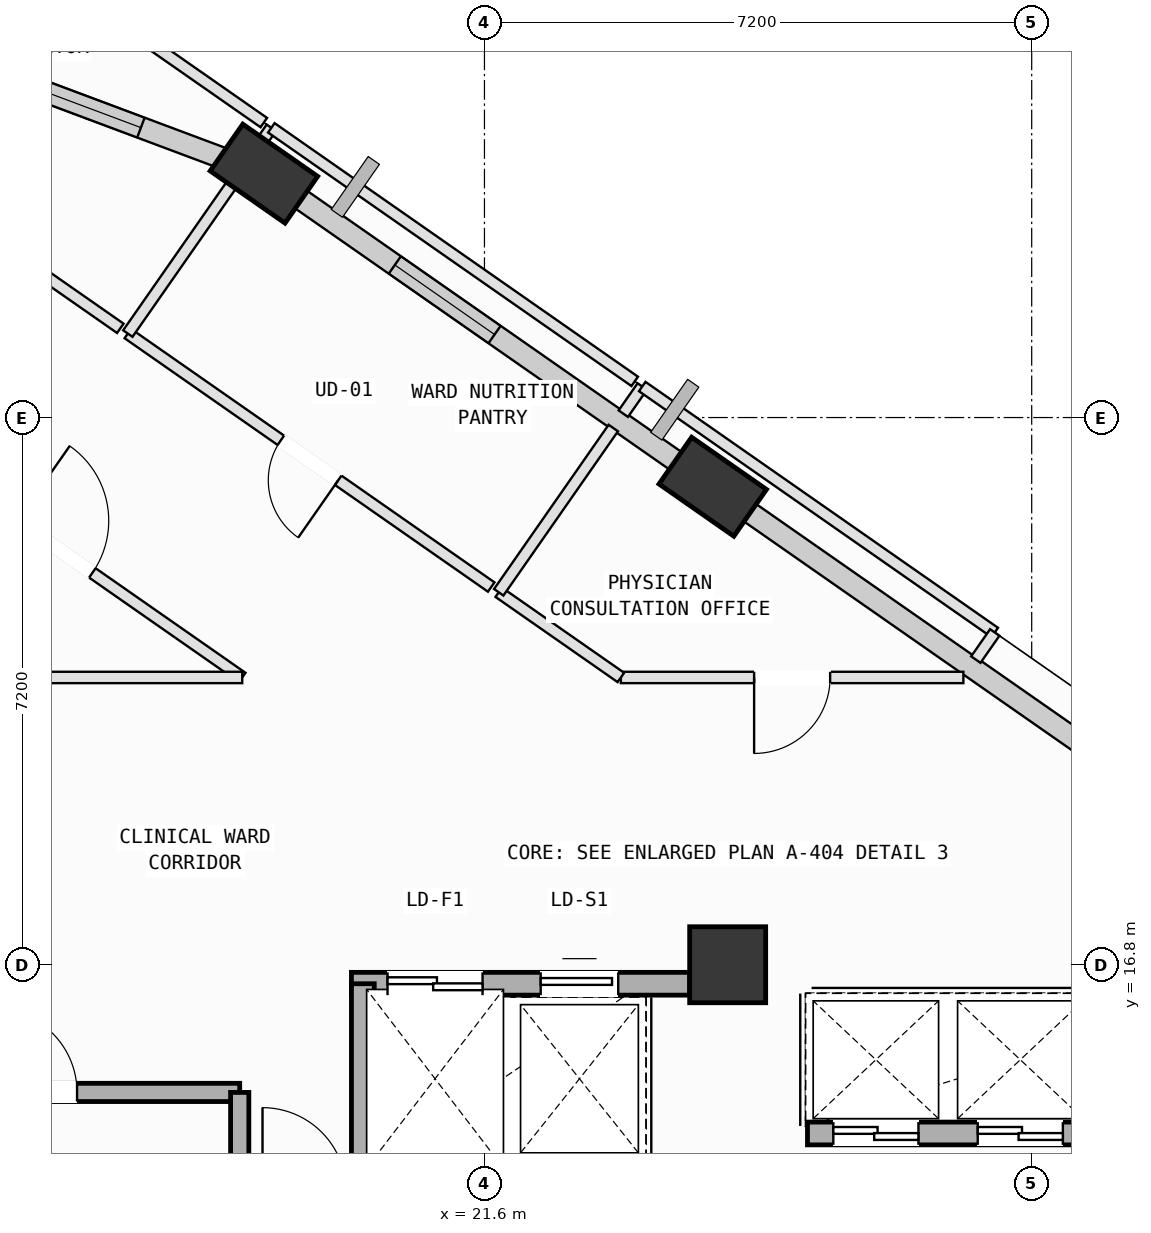
"""IFC4 building model, lengths in metres.
Left out: names, types, materials, properties, quantities, classifications, styles, units other than length and angle.
Written with IfcOpenShell. Run it as: python <this file> out.ifc"""

import sys

from ifc_helpers import new_model, si_unit, direction, frame, frame_2d, origin, origin_2d, place, context, subcontext, project, spatial, rectangle, extrude, element, fill, save


model = new_model("IFC4")
c1 = context("Model", 3, precision=1e-05, world=origin(), true_north=direction((0.0, 1.0)))
c2 = subcontext(c1, "Body", "Model", "MODEL_VIEW")
j1 = project(units=[si_unit("LENGTHUNIT", "METRE"), si_unit("PLANEANGLEUNIT", "RADIAN")], contexts=[c1])
p1 = place(None, origin())
s1 = spatial("IfcSite", under=j1, at=p1, CompositionType="ELEMENT")
p2 = place(p1, origin())
s2 = spatial("IfcBuilding", under=s1, at=p2, CompositionType="ELEMENT")
p3 = place(p2, frame((0.0, 0.0, 259.2)))
s3 = spatial("IfcBuildingStorey", under=s2, at=p3, CompositionType="ELEMENT", Elevation=259.2)
p4 = place(p3, frame((24.8, 16.8, 0.0), z_axis=(0.0, 0.0, 1.0), x_axis=(1.0, 0.0, 0.0)))
e1 = element("IfcColumn", 1, at=p4, inside=s3, PredefinedType="COLUMN", context=c2, shape_type="SweptSolid", body=[
    extrude(rectangle(XDim=1.0, YDim=1.0, at=origin_2d()), origin(), (0.0, 0.0, 1.0), 4.0),
])
p5 = place(p3, frame((24.604, 23.09, 0.002), z_axis=(0.007386709361, -0.037177735545, 0.999281368036), x_axis=(-0.915845651097, 0.400944413579, 0.021686875903)))
e2 = element("IfcColumn", 2, at=p5, inside=s3, PredefinedType="COLUMN", context=c2, shape_type="SweptSolid", body=[
    extrude(rectangle(XDim=1.2, YDim=0.75, at=origin_2d()), origin(), (0.0, 0.0, 1.0), 3.999),
])
p6 = place(p3, frame((18.698, 27.209, 0.002), z_axis=(-0.009450651527, -0.061703608682, 0.998049773238), x_axis=(-0.724246077082, 0.688616038079, 0.035715149892)))
e3 = element("IfcColumn", 3, at=p6, inside=s3, PredefinedType="COLUMN", context=c2, shape_type="SweptSolid", body=[
    extrude(rectangle(XDim=1.2, YDim=0.75, at=origin_2d()), origin(), (0.0, 0.0, 1.0), 4.004),
])
p7 = place(p3, frame((24.972, 22.833, 0.0), z_axis=(0.0, 0.0, 1.0), x_axis=(0.820150694585, -0.572147566779, 0.0)))
e4 = element("IfcWall", 4, at=p7, inside=s3, PredefinedType="SOLIDWALL", context=c2, shape_type="SweptSolid", body=[
    extrude(rectangle(XDim=6.958, YDim=0.28, at=frame_2d((3.479, 0.0))), origin(), (0.0, 0.0, 1.0), 3.165),
])
p8 = place(p3, frame((19.056, 26.959, 0.0), z_axis=(0.0, 0.0, 1.0), x_axis=(0.820153911143, -0.572142955945, 0.0)))
e5 = element("IfcWall", 5, at=p8, inside=s3, PredefinedType="SOLIDWALL", context=c2, shape_type="SweptSolid", body=[
    extrude(rectangle(XDim=6.424, YDim=0.28, at=frame_2d((3.212, 0.0))), origin(), (0.0, 0.0, 1.0), 3.265),
])
p9 = place(p8, frame((1.664, 0.0, 0.75)))
e6 = element("IfcOpeningElement", 6, at=p9, cuts=e5, PredefinedType="OPENING", context=c2, shape_type="SweptSolid", body=[
    extrude(rectangle(XDim=1.6, YDim=1.95, at=frame_2d((0.8, 0.975))), frame((0.0, 0.15, 0.0), z_axis=(0.0, -1.0, 0.0), x_axis=(1.0, 0.0, 0.0)), (0.0, 0.0, 1.0), 0.3),
])
p10 = place(p3, frame((13.402, 29.191, 0.0), z_axis=(0.0, 0.0, 1.0), x_axis=(0.936554152669, -0.350522922387, 0.0)))
e7 = element("IfcWall", 7, at=p10, inside=s3, PredefinedType="SOLIDWALL", context=c2, shape_type="SweptSolid", body=[
    extrude(rectangle(XDim=5.302, YDim=0.28, at=frame_2d((2.651, 0.0))), origin(), (0.0, 0.0, 1.0), 3.265),
])
p11 = place(p10, frame((1.927, 0.0, 0.75)))
e8 = element("IfcOpeningElement", 8, at=p11, cuts=e7, PredefinedType="OPENING", context=c2, shape_type="SweptSolid", body=[
    extrude(rectangle(XDim=2.0, YDim=1.95, at=frame_2d((1.0, 0.975))), frame((0.0, 0.15, 0.0), z_axis=(0.0, -1.0, 0.0), x_axis=(1.0, 0.0, 0.0)), (0.0, 0.0, 1.0), 0.3),
])
p12 = place(p3, frame((14.92, 15.12, 0.0), z_axis=(0.0, 0.0, 1.0), x_axis=(1.0, 0.0, 0.0)))
e9 = element("IfcWall", 9, at=p12, inside=s3, PredefinedType="SOLIDWALL", context=c2, shape_type="SweptSolid", body=[
    extrude(rectangle(XDim=3.46, YDim=0.24, at=frame_2d((1.73, 0.0))), origin(), (0.0, 0.0, 1.0), 3.78),
])
p13 = place(p12, frame((0.22, 0.0, 0.0)))
e10 = element("IfcOpeningElement", 10, at=p13, cuts=e9, PredefinedType="OPENING", context=c2, shape_type="SweptSolid", body=[
    extrude(rectangle(XDim=1.1, YDim=2.15, at=frame_2d((0.55, 1.075))), frame((0.0, 0.13, 0.0), z_axis=(0.0, -1.0, 0.0), x_axis=(1.0, 0.0, 0.0)), (0.0, 0.0, 1.0), 0.26),
])
p14 = place(p3, frame((18.38, 15.12, 0.0), z_axis=(0.0, 0.0, 1.0), x_axis=(0.0, -1.0, 0.0)))
e11 = element("IfcWall", 11, at=p14, inside=s3, PredefinedType="SOLIDWALL", context=c2, shape_type="SweptSolid", body=[
    extrude(rectangle(XDim=7.045, YDim=0.24, at=frame_2d((3.522, 0.0))), origin(), (0.0, 0.0, 1.0), 3.78),
])
p15 = place(p3, frame((19.85, 16.55, 0.0), z_axis=(0.0, 0.0, 1.0), x_axis=(1.0, 0.0, 0.0)))
e12 = element("IfcWall", 12, at=p15, inside=s3, PredefinedType="SOLIDWALL", context=c2, shape_type="SweptSolid", body=[
    extrude(rectangle(XDim=4.45, YDim=0.3, at=frame_2d((2.225, 0.0))), origin(), (0.0, 0.0, 1.0), 3.78),
])
p16 = place(p15, frame((0.475, 0.0, 0.0)))
e13 = element("IfcOpeningElement", 13, at=p16, cuts=e12, PredefinedType="OPENING", context=c2, shape_type="SweptSolid", body=[
    extrude(rectangle(XDim=1.25, YDim=2.18, at=frame_2d((0.625, 1.09))), frame((0.0, 0.16, 0.0), z_axis=(0.0, -1.0, 0.0), x_axis=(1.0, 0.0, 0.0)), (0.0, 0.0, 1.0), 0.32),
])
p17 = place(p15, frame((2.49, 0.0, 0.0)))
e14 = element("IfcOpeningElement", 14, at=p17, cuts=e12, PredefinedType="OPENING", context=c2, shape_type="SweptSolid", body=[
    extrude(rectangle(XDim=1.02, YDim=2.12, at=frame_2d((0.51, 1.06))), frame((0.0, 0.16, 0.0), z_axis=(0.0, -1.0, 0.0), x_axis=(1.0, 0.0, 0.0)), (0.0, 0.0, 1.0), 0.32),
])
p18 = place(p3, frame((20.0, 13.82, 0.0), z_axis=(0.0, 0.0, 1.0), x_axis=(0.0, 1.0, 0.0)))
e15 = element("IfcWall", 15, at=p18, inside=s3, PredefinedType="SOLIDWALL", context=c2, shape_type="SweptSolid", body=[
    extrude(rectangle(XDim=2.73, YDim=0.3, at=frame_2d((1.365, 0.0))), origin(), (0.0, 0.0, 1.0), 3.78),
])
p19 = place(p3, frame((25.85, 14.58, 0.0), z_axis=(0.0, 0.0, 1.0), x_axis=(1.0, 0.0, 0.0)))
e16 = element("IfcWall", 16, at=p19, inside=s3, PredefinedType="SOLIDWALL", context=c2, shape_type="SweptSolid", body=[
    extrude(rectangle(XDim=5.45, YDim=0.3, at=frame_2d((2.725, 0.0))), origin(), (0.0, 0.0, 1.0), 3.78),
])
p20 = place(p19, frame((0.34, 0.0, 0.0)))
e17 = element("IfcOpeningElement", 17, at=p20, cuts=e16, PredefinedType="OPENING", context=c2, shape_type="SweptSolid", body=[
    extrude(rectangle(XDim=1.12, YDim=2.15, at=frame_2d((0.56, 1.075))), frame((0.0, 0.16, 0.0), z_axis=(0.0, -1.0, 0.0), x_axis=(1.0, 0.0, 0.0)), (0.0, 0.0, 1.0), 0.32),
])
p21 = place(p19, frame((2.24, 0.0, 0.0)))
e18 = element("IfcOpeningElement", 18, at=p21, cuts=e16, PredefinedType="OPENING", context=c2, shape_type="SweptSolid", body=[
    extrude(rectangle(XDim=1.12, YDim=2.15, at=frame_2d((0.56, 1.075))), frame((0.0, 0.16, 0.0), z_axis=(0.0, -1.0, 0.0), x_axis=(1.0, 0.0, 0.0)), (0.0, 0.0, 1.0), 0.32),
])
p22 = place(p3, frame((13.485, 24.018, 0.0), z_axis=(0.0, 0.0, 1.0), x_axis=(0.820137595975, -0.572166342656, 0.0)))
e19 = element("IfcWall", 19, at=p22, inside=s3, PredefinedType="PARTITIONING", context=c2, shape_type="SweptSolid", body=[
    extrude(rectangle(XDim=6.009, YDim=0.15, at=frame_2d((3.004, 0.0))), origin(), (0.0, 0.0, 1.0), 3.415),
])
p23 = place(p22, frame((2.404, 0.0, 0.0)))
e20 = element("IfcOpeningElement", 20, at=p23, cuts=e19, PredefinedType="OPENING", context=c2, shape_type="SweptSolid", body=[
    extrude(rectangle(XDim=1.2, YDim=2.15, at=frame_2d((0.6, 1.075))), frame((0.0, 0.085, 0.0), z_axis=(0.0, -1.0, 0.0), x_axis=(1.0, 0.0, 0.0)), (0.0, 0.0, 1.0), 0.17),
])
p24 = place(p3, frame((18.413, 20.58, 0.0), z_axis=(0.0, 0.0, 1.0), x_axis=(-1.0, 0.0, 0.0)))
e21 = element("IfcWall", 21, at=p24, inside=s3, PredefinedType="PARTITIONING", context=c2, shape_type="SweptSolid", body=[
    extrude(rectangle(XDim=3.416, YDim=0.15, at=frame_2d((1.708, 0.0))), origin(), (0.0, 0.0, 1.0), 3.78),
])
p25 = place(p3, frame((27.901, 20.58, 0.0), z_axis=(0.0, 0.0, 1.0), x_axis=(-1.0, 0.0, 0.0)))
e22 = element("IfcWall", 22, at=p25, inside=s3, PredefinedType="PARTITIONING", context=c2, shape_type="SweptSolid", body=[
    extrude(rectangle(XDim=4.506, YDim=0.15, at=frame_2d((2.253, 0.0))), origin(), (0.0, 0.0, 1.0), 3.415),
])
p26 = place(p25, frame((1.753, 0.0, 0.0)))
e23 = element("IfcOpeningElement", 23, at=p26, cuts=e22, PredefinedType="OPENING", context=c2, shape_type="SweptSolid", body=[
    extrude(rectangle(XDim=1.0, YDim=2.12, at=frame_2d((0.5, 1.06))), frame((0.0, 0.085, 0.0), z_axis=(0.0, -1.0, 0.0), x_axis=(1.0, 0.0, 0.0)), (0.0, 0.0, 1.0), 0.17),
])
p27 = place(p3, frame((23.395, 20.58, 0.0), z_axis=(0.0, 0.0, 1.0), x_axis=(-0.820190863983, 0.572089981244, 0.0)))
e24 = element("IfcWall", 24, at=p27, inside=s3, PredefinedType="PARTITIONING", context=c2, shape_type="SweptSolid", body=[
    extrude(rectangle(XDim=1.959, YDim=0.15, at=frame_2d((0.979, 0.0))), origin(), (0.0, 0.0, 1.0), 3.415),
])
p28 = place(p3, frame((21.788, 21.701, 0.0), z_axis=(0.0, 0.0, 1.0), x_axis=(0.571943852359, 0.820292770752, 0.0)))
e25 = element("IfcWall", 25, at=p28, inside=s3, PredefinedType="PARTITIONING", context=c2, shape_type="SweptSolid", body=[
    extrude(rectangle(XDim=2.635, YDim=0.15, at=frame_2d((1.317, 0.0))), origin(), (0.0, 0.0, 1.0), 3.78),
])
p29 = place(p3, frame((23.427, 24.051, 0.0), z_axis=(0.0, 0.0, 1.0), x_axis=(0.572181596024, 0.820126954301, 0.0)))
e26 = element("IfcWall", 26, at=p29, inside=s3, PredefinedType="PARTITIONING", context=c2, shape_type="SweptSolid", body=[
    extrude(rectangle(XDim=0.435, YDim=0.15, at=frame_2d((0.218, 0.0))), origin(), (0.0, 0.0, 1.0), 3.78),
])
p30 = place(p3, frame((23.676, 24.408, 0.0), z_axis=(0.0, 0.0, 1.0), x_axis=(0.820121300716, -0.57218969941, 0.0)))
e27 = element("IfcWall", 27, at=p30, inside=s3, PredefinedType="PARTITIONING", context=c2, shape_type="SweptSolid", body=[
    extrude(rectangle(XDim=5.655, YDim=0.15, at=frame_2d((2.828, 0.0))), origin(), (0.0, 0.0, 1.0), 3.78),
])
p31 = place(p3, frame((28.314, 21.172, 0.0), z_axis=(0.0, 0.0, 1.0), x_axis=(-0.571918449579, -0.820310482093, 0.0)))
e28 = element("IfcWall", 28, at=p31, inside=s3, PredefinedType="PARTITIONING", context=c2, shape_type="SweptSolid", body=[
    extrude(rectangle(XDim=0.435, YDim=0.15, at=frame_2d((0.218, 0.0))), origin(), (0.0, 0.0, 1.0), 3.78),
])
p32 = place(p3, frame((21.689, 21.77, 0.0), z_axis=(0.0, 0.0, 1.0), x_axis=(-0.820177227942, 0.572109530393, 0.0)))
e29 = element("IfcWall", 29, at=p32, inside=s3, PredefinedType="PARTITIONING", context=c2, shape_type="SweptSolid", body=[
    extrude(rectangle(XDim=5.829, YDim=0.15, at=frame_2d((2.915, 0.0))), origin(), (0.0, 0.0, 1.0), 3.78),
])
p33 = place(p32, frame((2.455, 0.0, 0.0)))
e30 = element("IfcOpeningElement", 30, at=p33, cuts=e29, PredefinedType="OPENING", context=c2, shape_type="SweptSolid", body=[
    extrude(rectangle(XDim=0.92, YDim=2.1, at=frame_2d((0.46, 1.05))), frame((0.0, 0.085, 0.0), z_axis=(0.0, -1.0, 0.0), x_axis=(1.0, 0.0, 0.0)), (0.0, 0.0, 1.0), 0.17),
])
p34 = place(p3, frame((16.908, 25.105, 0.0), z_axis=(0.0, 0.0, 1.0), x_axis=(0.571980057707, 0.820267525619, 0.0)))
e31 = element("IfcWall", 31, at=p34, inside=s3, PredefinedType="PARTITIONING", context=c2, shape_type="SweptSolid", body=[
    extrude(rectangle(XDim=2.577, YDim=0.15, at=frame_2d((1.289, 0.0))), origin(), (0.0, 0.0, 1.0), 3.78),
])
p35 = place(p3, frame((18.48, 27.359, 0.0), z_axis=(0.0, 0.0, 1.0), x_axis=(0.571918856156, 0.820310198628, 0.0)))
e32 = element("IfcWall", 32, at=p35, inside=s3, PredefinedType="PARTITIONING", context=c2, shape_type="SweptSolid", body=[
    extrude(rectangle(XDim=0.552, YDim=0.15, at=frame_2d((0.276, 0.0))), origin(), (0.0, 0.0, 1.0), 3.78),
])
p36 = place(p3, frame((18.796, 27.812, 0.0), z_axis=(0.0, 0.0, 1.0), x_axis=(0.820098618175, -0.572222208995, 0.0)))
e33 = element("IfcWall", 33, at=p36, inside=s3, PredefinedType="PARTITIONING", context=c2, shape_type="SweptSolid", body=[
    extrude(rectangle(XDim=5.83, YDim=0.15, at=frame_2d((2.915, 0.0))), origin(), (0.0, 0.0, 1.0), 3.78),
])
p37 = place(p3, frame((14.994, 30.464, 0.0), z_axis=(0.0, 0.0, 1.0), x_axis=(0.820185960607, -0.572097011025, 0.0)))
e34 = element("IfcWall", 34, at=p37, inside=s3, PredefinedType="PARTITIONING", context=c2, shape_type="SweptSolid", body=[
    extrude(rectangle(XDim=4.515, YDim=0.15, at=frame_2d((2.257, 0.0))), origin(), (0.0, 0.0, 1.0), 3.78),
])
p38 = place(p3, frame((16.809, 25.174, 0.0), z_axis=(0.0, 0.0, 1.0), x_axis=(-0.820095076811, 0.572227284382, 0.0)))
e35 = element("IfcWall", 35, at=p38, inside=s3, PredefinedType="PARTITIONING", context=c2, shape_type="SweptSolid", body=[
    extrude(rectangle(XDim=5.349, YDim=0.15, at=frame_2d((2.675, 0.0))), origin(), (0.0, 0.0, 1.0), 3.78),
])
p39 = place(p38, frame((2.215, 0.0, 0.0)))
e36 = element("IfcOpeningElement", 36, at=p39, cuts=e35, PredefinedType="OPENING", context=c2, shape_type="SweptSolid", body=[
    extrude(rectangle(XDim=0.92, YDim=2.1, at=frame_2d((0.46, 1.05))), frame((0.0, 0.085, 0.0), z_axis=(0.0, -1.0, 0.0), x_axis=(1.0, 0.0, 0.0)), (0.0, 0.0, 1.0), 0.17),
])
p40 = place(p9, origin())
e37 = element("IfcWindow", 37, at=p40, inside=s3, PartitioningType="SINGLE_PANEL", PredefinedType="WINDOW", context=c2, shape_type="SweptSolid", body=[
    extrude(rectangle(XDim=1.6, YDim=1.95, at=frame_2d((0.8, 0.975))), frame((0.0, 0.03, 0.0), z_axis=(0.0, -1.0, 0.0), x_axis=(1.0, 0.0, 0.0)), (0.0, 0.0, 1.0), 0.06),
])
fill(e6, e37)
p41 = place(p11, origin())
e38 = element("IfcWindow", 38, at=p41, inside=s3, PartitioningType="SINGLE_PANEL", PredefinedType="WINDOW", context=c2, shape_type="SweptSolid", body=[
    extrude(rectangle(XDim=2.0, YDim=1.95, at=frame_2d((1.0, 0.975))), frame((0.0, 0.03, 0.0), z_axis=(0.0, -1.0, 0.0), x_axis=(1.0, 0.0, 0.0)), (0.0, 0.0, 1.0), 0.06),
])
fill(e8, e38)
p42 = place(p13, origin())
e39 = element("IfcDoor", 39, at=p42, inside=s3, OperationType="SINGLE_SWING_LEFT", PredefinedType="DOOR", context=c2, shape_type="SweptSolid", body=[
    extrude(rectangle(XDim=1.1, YDim=2.15, at=frame_2d((0.55, 1.075))), frame((0.0, 0.025, 0.0), z_axis=(0.0, -1.0, 0.0), x_axis=(1.0, 0.0, 0.0)), (0.0, 0.0, 1.0), 0.05),
])
fill(e10, e39)
p43 = place(p20, origin())
e40 = element("IfcDoor", 40, at=p43, inside=s3, OperationType="DOUBLE_DOOR_SLIDING", PredefinedType="DOOR", context=c2, shape_type="SweptSolid", body=[
    extrude(rectangle(XDim=1.12, YDim=2.15, at=frame_2d((0.56, 1.075))), frame((0.0, 0.025, 0.0), z_axis=(0.0, -1.0, 0.0), x_axis=(1.0, 0.0, 0.0)), (0.0, 0.0, 1.0), 0.05),
])
fill(e17, e40)
p44 = place(p21, origin())
e41 = element("IfcDoor", 41, at=p44, inside=s3, OperationType="DOUBLE_DOOR_SLIDING", PredefinedType="DOOR", context=c2, shape_type="SweptSolid", body=[
    extrude(rectangle(XDim=1.12, YDim=2.15, at=frame_2d((0.56, 1.075))), frame((0.0, 0.025, 0.0), z_axis=(0.0, -1.0, 0.0), x_axis=(1.0, 0.0, 0.0)), (0.0, 0.0, 1.0), 0.05),
])
fill(e18, e41)
p45 = place(p16, origin())
e42 = element("IfcDoor", 42, at=p45, inside=s3, OperationType="DOUBLE_DOOR_SLIDING", PredefinedType="DOOR", context=c2, shape_type="SweptSolid", body=[
    extrude(rectangle(XDim=1.25, YDim=2.18, at=frame_2d((0.625, 1.09))), frame((0.0, 0.025, 0.0), z_axis=(0.0, -1.0, 0.0), x_axis=(1.0, 0.0, 0.0)), (0.0, 0.0, 1.0), 0.05),
])
fill(e13, e42)
p46 = place(p17, origin())
e43 = element("IfcDoor", 43, at=p46, inside=s3, OperationType="SLIDING_TO_LEFT", PredefinedType="DOOR", context=c2, shape_type="SweptSolid", body=[
    extrude(rectangle(XDim=1.02, YDim=2.12, at=frame_2d((0.51, 1.06))), frame((0.0, 0.025, 0.0), z_axis=(0.0, -1.0, 0.0), x_axis=(1.0, 0.0, 0.0)), (0.0, 0.0, 1.0), 0.05),
])
fill(e14, e43)
p47 = place(p23, origin())
e44 = element("IfcDoor", 44, at=p47, inside=s3, OperationType="SINGLE_SWING_LEFT", PredefinedType="DOOR", context=c2, shape_type="SweptSolid", body=[
    extrude(rectangle(XDim=1.2, YDim=2.15, at=frame_2d((0.6, 1.075))), frame((0.0, 0.025, 0.0), z_axis=(0.0, -1.0, 0.0), x_axis=(1.0, 0.0, 0.0)), (0.0, 0.0, 1.0), 0.05),
])
fill(e20, e44)
p48 = place(p26, origin())
e45 = element("IfcDoor", 45, at=p48, inside=s3, OperationType="SINGLE_SWING_RIGHT", PredefinedType="DOOR", context=c2, shape_type="SweptSolid", body=[
    extrude(rectangle(XDim=1.0, YDim=2.12, at=frame_2d((0.5, 1.06))), frame((0.0, 0.025, 0.0), z_axis=(0.0, -1.0, 0.0), x_axis=(1.0, 0.0, 0.0)), (0.0, 0.0, 1.0), 0.05),
])
fill(e23, e45)
p49 = place(p33, origin())
e46 = element("IfcDoor", 46, at=p49, inside=s3, OperationType="SINGLE_SWING_LEFT", PredefinedType="DOOR", context=c2, shape_type="SweptSolid", body=[
    extrude(rectangle(XDim=0.92, YDim=2.1, at=frame_2d((0.46, 1.05))), frame((0.0, 0.025, 0.0), z_axis=(0.0, -1.0, 0.0), x_axis=(1.0, 0.0, 0.0)), (0.0, 0.0, 1.0), 0.05),
])
fill(e30, e46)
save(model, sys.argv[1])
